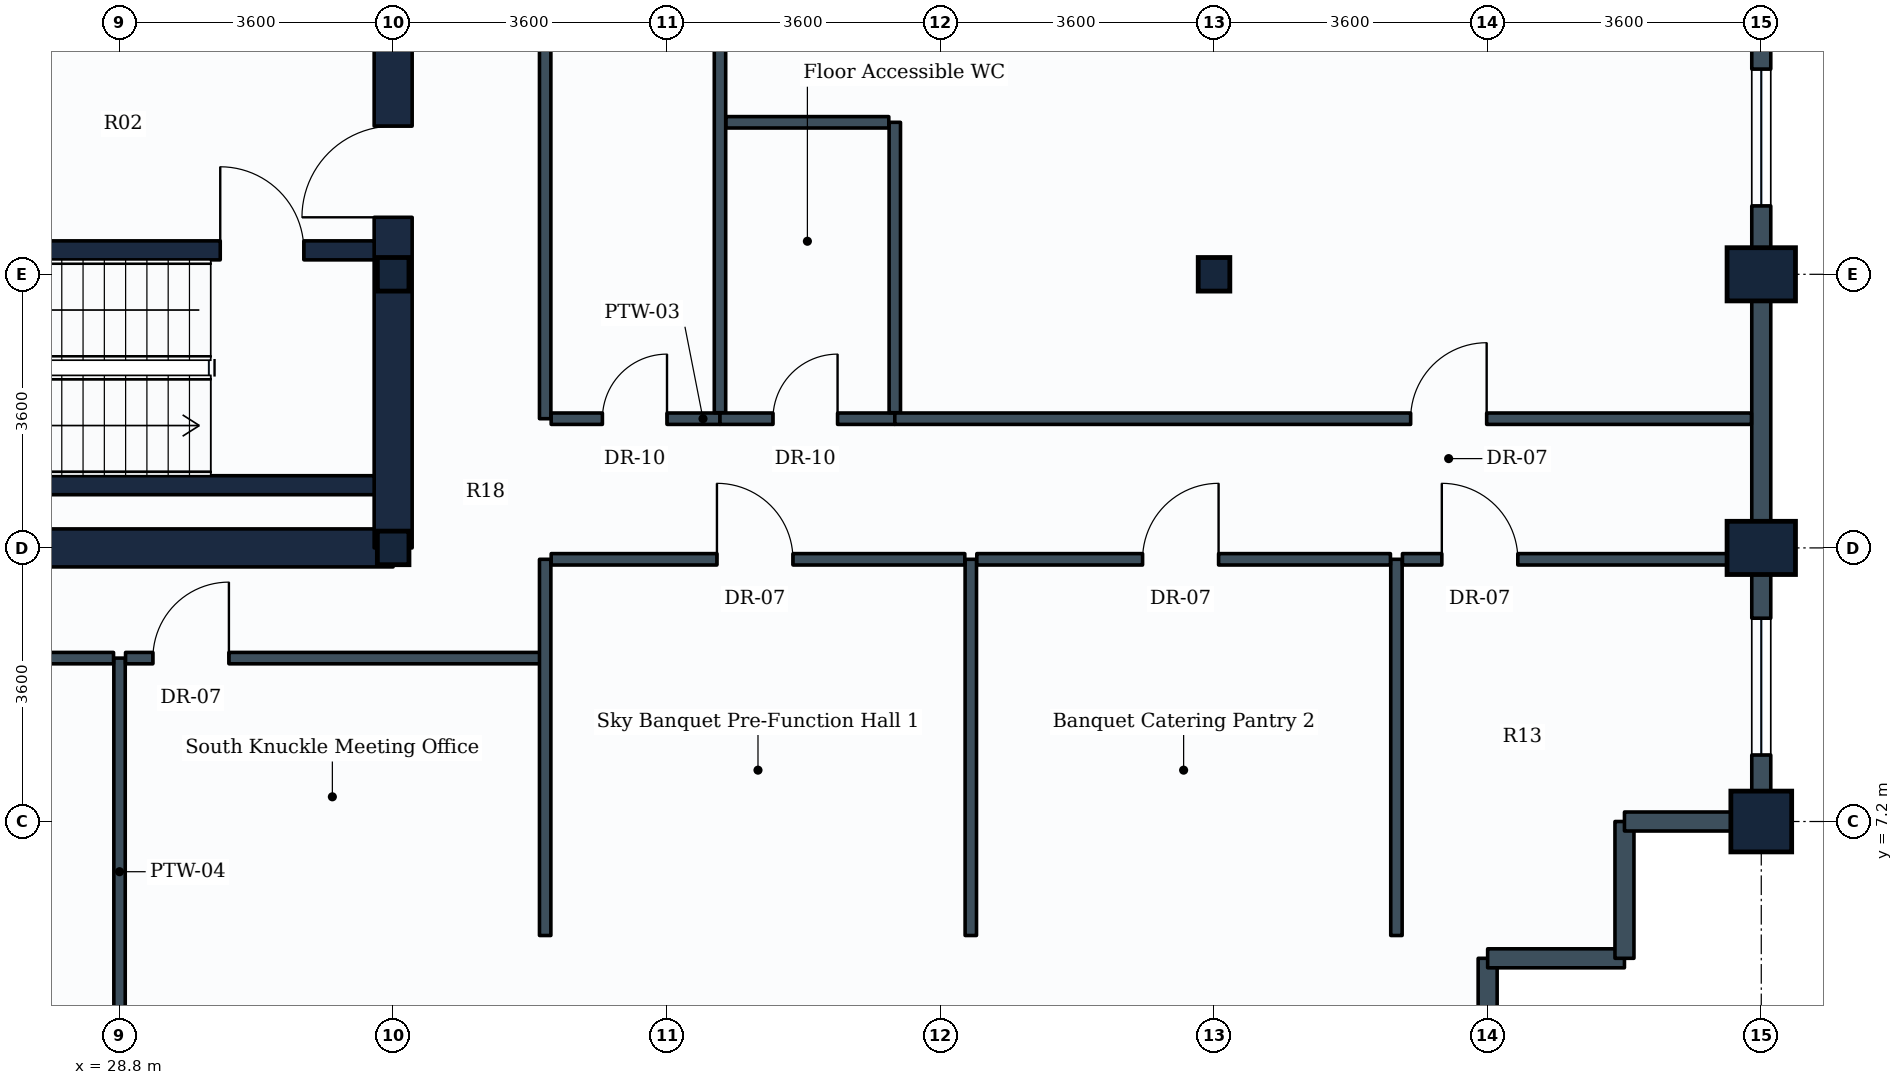
"""IFC4 building model, lengths in metres.
Left out: names, types, materials, properties, quantities, classifications, styles, units other than length and angle.
Written with IfcOpenShell. Run it as: python <this file> out.ifc"""

import sys

from ifc_helpers import new_model, si_unit, direction, frame, frame_2d, origin, origin_2d, place, context, subcontext, project, spatial, rectangle, i_section, extrude, element, fill, save


model = new_model("IFC4")
c1 = context("Model", 3, precision=1e-05, world=origin(), true_north=direction((0.0, 1.0)))
c2 = subcontext(c1, "Body", "Model", "MODEL_VIEW")
j1 = project(units=[si_unit("LENGTHUNIT", "METRE"), si_unit("PLANEANGLEUNIT", "RADIAN")], contexts=[c1])
p1 = place(None, origin())
s1 = spatial("IfcSite", under=j1, at=p1, CompositionType="ELEMENT")
p2 = place(p1, origin())
s2 = spatial("IfcBuilding", under=s1, at=p2, CompositionType="ELEMENT")
p3 = place(p2, frame((0.0, 0.0, 205.2)))
s3 = spatial("IfcBuildingStorey", under=s2, at=p3, CompositionType="ELEMENT", Elevation=205.2)
for number, where, z_axis, x_axis in (
    (1, (32.4, 10.8, 0.0), (0.0, 0.0, 1.0), (1.0, 0.0, 0.0)),
    (2, (32.4, 14.4, 0.0), (0.0, 0.0, 1.0), (1.0, 0.0, 0.0)),
    (3, (43.2, 14.4, 0.0), (0.0, 0.0, 1.0), (1.0, 0.0, 0.0)),
):
    element("IfcColumn", number, at=place(p3, frame(where, z_axis=z_axis, x_axis=x_axis)), inside=s3, PredefinedType="COLUMN", context=c2, shape_type="SweptSolid", body=[
        extrude(i_section(OverallWidth=0.416, OverallDepth=0.442, WebThickness=0.025, FlangeThickness=0.041, FilletRadius=0.015, at=origin_2d()), origin(), (0.0, 0.0, 1.0), 3.8),
    ])
p4 = place(p3, frame((50.4, 7.2, 0.0), z_axis=(0.0, 0.0, 1.0), x_axis=(1.0, 0.0, 0.0)))
e4 = element("IfcColumn", 4, at=p4, inside=s3, PredefinedType="COLUMN", context=c2, shape_type="SweptSolid", body=[
    extrude(rectangle(XDim=0.8, YDim=0.8, at=origin_2d()), origin(), (0.0, 0.0, 1.0), 3.8),
])
for number, where, z_axis, x_axis in (
    (5, (50.4, 10.8, 0.0), (0.0, 0.0, 1.0), (0.0, 1.0, 0.0)),
    (6, (50.4, 14.4, 0.0), (0.0, 0.0, 1.0), (0.0, 1.0, 0.0)),
):
    element("IfcColumn", number, at=place(p3, frame(where, z_axis=z_axis, x_axis=x_axis)), inside=s3, PredefinedType="COLUMN", context=c2, shape_type="SweptSolid", body=[
        extrude(rectangle(XDim=0.7, YDim=0.9, at=origin_2d()), origin(), (0.0, 0.0, 1.0), 3.8),
    ])
p5 = place(p3, frame((46.8, 5.4, 0.0), z_axis=(0.0, 0.0, 1.0), x_axis=(0.0, -1.0, 0.0)))
e7 = element("IfcWall", 7, at=p5, inside=s3, PredefinedType="STANDARD", context=c2, shape_type="SweptSolid", body=[
    extrude(rectangle(XDim=1.8, YDim=0.25, at=frame_2d((0.9, 0.0))), origin(), (0.0, 0.0, 1.0), 2.93),
])
for number, where, z_axis, x_axis in (
    (8, (48.6, 5.4, 0.0), (0.0, 0.0, 1.0), (-1.0, 0.0, 0.0)),
    (9, (48.6, 7.2, 0.0), (0.0, 0.0, 1.0), (0.0, -1.0, 0.0)),
):
    element("IfcWall", number, at=place(p3, frame(where, z_axis=z_axis, x_axis=x_axis)), inside=s3, PredefinedType="STANDARD", context=c2, shape_type="SweptSolid", body=[
        extrude(rectangle(XDim=1.8, YDim=0.25, at=frame_2d((0.9, 0.0))), origin(), (0.0, 0.0, 1.0), 3.465),
    ])
p6 = place(p3, frame((50.4, 7.2, 0.0), z_axis=(0.0, 0.0, 1.0), x_axis=(-1.0, 0.0, 0.0)))
e10 = element("IfcWall", 10, at=p6, inside=s3, PredefinedType="STANDARD", context=c2, shape_type="SweptSolid", body=[
    extrude(rectangle(XDim=1.8, YDim=0.25, at=frame_2d((0.9, 0.0))), origin(), (0.0, 0.0, 1.0), 2.93),
])
p7 = place(p3, frame((50.4, 10.8, 0.0), z_axis=(0.0, 0.0, 1.0), x_axis=(0.0, -1.0, 0.0)))
e11 = element("IfcWall", 11, at=p7, inside=s3, PredefinedType="STANDARD", context=c2, shape_type="SweptSolid", body=[
    extrude(rectangle(XDim=3.6, YDim=0.25, at=frame_2d((1.8, 0.0))), origin(), (0.0, 0.0, 1.0), 2.93),
])
p8 = place(p7, frame((0.925, 0.0, 0.85)))
e12 = element("IfcOpeningElement", 12, at=p8, cuts=e11, PredefinedType="OPENING", context=c2, shape_type="SweptSolid", body=[
    extrude(rectangle(XDim=1.8, YDim=1.35, at=frame_2d((0.9, 0.675))), frame((0.0, 0.135, 0.0), z_axis=(0.0, -1.0, 0.0), x_axis=(1.0, 0.0, 0.0)), (0.0, 0.0, 1.0), 0.27),
])
p9 = place(p3, frame((50.4, 14.4, 0.0), z_axis=(0.0, 0.0, 1.0), x_axis=(0.0, -1.0, 0.0)))
e13 = element("IfcWall", 13, at=p9, inside=s3, PredefinedType="STANDARD", context=c2, shape_type="SweptSolid", body=[
    extrude(rectangle(XDim=3.6, YDim=0.25, at=frame_2d((1.8, 0.0))), origin(), (0.0, 0.0, 1.0), 2.93),
])
p10 = place(p3, frame((50.4, 18.0, 0.0), z_axis=(0.0, 0.0, 1.0), x_axis=(0.0, -1.0, 0.0)))
e14 = element("IfcWall", 14, at=p10, inside=s3, PredefinedType="STANDARD", context=c2, shape_type="SweptSolid", body=[
    extrude(rectangle(XDim=3.6, YDim=0.25, at=frame_2d((1.8, 0.0))), origin(), (0.0, 0.0, 1.0), 2.93),
])
p11 = place(p10, frame((0.9, 0.0, 0.85)))
e15 = element("IfcOpeningElement", 15, at=p11, cuts=e14, PredefinedType="OPENING", context=c2, shape_type="SweptSolid", body=[
    extrude(rectangle(XDim=1.8, YDim=1.35, at=frame_2d((0.9, 0.675))), frame((0.0, 0.135, 0.0), z_axis=(0.0, -1.0, 0.0), x_axis=(1.0, 0.0, 0.0)), (0.0, 0.0, 1.0), 0.27),
])
p12 = place(p3, frame((14.4, 10.8, 0.0), z_axis=(0.0, 0.0, 1.0), x_axis=(1.0, 0.0, 0.0)))
e16 = element("IfcWall", 16, at=p12, inside=s3, PredefinedType="SHEAR", context=c2, shape_type="SweptSolid", body=[
    extrude(rectangle(XDim=18.0, YDim=0.5, at=frame_2d((9.0, 0.0))), origin(), (0.0, 0.0, 1.0), 3.48),
])
p13 = place(p3, frame((32.4, 10.8, 0.0), z_axis=(0.0, 0.0, 1.0), x_axis=(0.0, 1.0, 0.0)))
e17 = element("IfcWall", 17, at=p13, inside=s3, PredefinedType="SHEAR", context=c2, shape_type="SweptSolid", body=[
    extrude(rectangle(XDim=14.4, YDim=0.5, at=frame_2d((7.2, 0.0))), origin(), (0.0, 0.0, 1.0), 3.48),
])
p14 = place(p13, frame((4.35, 0.0, 0.0)))
e18 = element("IfcOpeningElement", 18, at=p14, cuts=e17, PredefinedType="OPENING", context=c2, shape_type="SweptSolid", body=[
    extrude(rectangle(XDim=1.2, YDim=2.1, at=frame_2d((0.6, 1.05))), frame((0.0, 0.26, 0.0), z_axis=(0.0, -1.0, 0.0), x_axis=(1.0, 0.0, 0.0)), (0.0, 0.0, 1.0), 0.52),
])
p15 = place(p13, frame((10.0, 0.0, 0.0)))
e19 = element("IfcOpeningElement", 19, at=p15, cuts=e17, PredefinedType="OPENING", context=c2, shape_type="SweptSolid", body=[
    extrude(rectangle(XDim=1.2, YDim=2.1, at=frame_2d((0.6, 1.05))), frame((0.0, 0.26, 0.0), z_axis=(0.0, -1.0, 0.0), x_axis=(1.0, 0.0, 0.0)), (0.0, 0.0, 1.0), 0.52),
])
p16 = place(p3, frame((23.35, 11.625, 0.0), z_axis=(0.0, 0.0, 1.0), x_axis=(1.0, 0.0, 0.0)))
e20 = element("IfcWall", 20, at=p16, inside=s3, PredefinedType="SHEAR", context=c2, shape_type="SweptSolid", body=[
    extrude(rectangle(XDim=8.8, YDim=0.25, at=frame_2d((4.4, 0.0))), origin(), (0.0, 0.0, 1.0), 3.48),
])
p17 = place(p3, frame((23.35, 14.715, 0.0), z_axis=(0.0, 0.0, 1.0), x_axis=(1.0, 0.0, 0.0)))
e21 = element("IfcWall", 21, at=p17, inside=s3, PredefinedType="SHEAR", context=c2, shape_type="SweptSolid", body=[
    extrude(rectangle(XDim=8.8, YDim=0.25, at=frame_2d((4.4, 0.0))), origin(), (0.0, 0.0, 1.0), 3.48),
])
p18 = place(p17, frame((6.775, 0.0, 0.0)))
e22 = element("IfcOpeningElement", 22, at=p18, cuts=e21, PredefinedType="OPENING", context=c2, shape_type="SweptSolid", body=[
    extrude(rectangle(XDim=1.1, YDim=2.1, at=frame_2d((0.55, 1.05))), frame((0.0, 0.135, 0.0), z_axis=(0.0, -1.0, 0.0), x_axis=(1.0, 0.0, 0.0)), (0.0, 0.0, 1.0), 0.27),
])
p19 = place(p3, frame((34.4, 12.5, 0.0), z_axis=(0.0, 0.0, 1.0), x_axis=(0.0, 1.0, 0.0)))
e23 = element("IfcWall", 23, at=p19, inside=s3, PredefinedType="PARTITIONING", context=c2, shape_type="SweptSolid", body=[
    extrude(rectangle(XDim=12.571, YDim=0.15, at=frame_2d((6.286, 0.0))), origin(), (0.0, 0.0, 1.0), 2.93),
])
p20 = place(p3, frame((34.479, 12.5, 0.0), z_axis=(0.0, 0.0, 1.0), x_axis=(1.0, 0.0, 0.0)))
e24 = element("IfcWall", 24, at=p20, inside=s3, PredefinedType="PARTITIONING", context=c2, shape_type="SweptSolid", body=[
    extrude(rectangle(XDim=2.221, YDim=0.15, at=frame_2d((1.11, 0.0))), origin(), (0.0, 0.0, 1.0), 3.19),
])
p21 = place(p20, frame((0.674, 0.0, 0.0)))
e25 = element("IfcOpeningElement", 25, at=p21, cuts=e24, PredefinedType="OPENING", context=c2, shape_type="SweptSolid", body=[
    extrude(rectangle(XDim=0.85, YDim=2.1, at=frame_2d((0.425, 1.05))), frame((0.0, 0.085, 0.0), z_axis=(0.0, -1.0, 0.0), x_axis=(1.0, 0.0, 0.0)), (0.0, 0.0, 1.0), 0.17),
])
p22 = place(p3, frame((36.7, 12.579, 0.0), z_axis=(0.0, 0.0, 1.0), x_axis=(0.0, 1.0, 0.0)))
e26 = element("IfcWall", 26, at=p22, inside=s3, PredefinedType="PARTITIONING", context=c2, shape_type="SweptSolid", body=[
    extrude(rectangle(XDim=12.492, YDim=0.15, at=frame_2d((6.246, 0.0))), origin(), (0.0, 0.0, 1.0), 2.93),
])
p23 = place(p3, frame((36.7, 12.5, 0.0), z_axis=(0.0, 0.0, 1.0), x_axis=(1.0, 0.0, 0.0)))
e27 = element("IfcWall", 27, at=p23, inside=s3, PredefinedType="PARTITIONING", context=c2, shape_type="SweptSolid", body=[
    extrude(rectangle(XDim=2.3, YDim=0.15, at=frame_2d((1.15, 0.0))), origin(), (0.0, 0.0, 1.0), 3.465),
])
p24 = place(p23, frame((0.697, 0.0, 0.0)))
e28 = element("IfcOpeningElement", 28, at=p24, cuts=e27, PredefinedType="OPENING", context=c2, shape_type="SweptSolid", body=[
    extrude(rectangle(XDim=0.85, YDim=2.1, at=frame_2d((0.425, 1.05))), frame((0.0, 0.085, 0.0), z_axis=(0.0, -1.0, 0.0), x_axis=(1.0, 0.0, 0.0)), (0.0, 0.0, 1.0), 0.17),
])
p25 = place(p3, frame((39.0, 12.579, 0.0), z_axis=(0.0, 0.0, 1.0), x_axis=(0.0, 1.0, 0.0)))
e29 = element("IfcWall", 29, at=p25, inside=s3, PredefinedType="PARTITIONING", context=c2, shape_type="SweptSolid", body=[
    extrude(rectangle(XDim=3.821, YDim=0.15, at=frame_2d((1.91, 0.0))), origin(), (0.0, 0.0, 1.0), 3.16),
])
p26 = place(p3, frame((36.779, 16.4, 0.0), z_axis=(0.0, 0.0, 1.0), x_axis=(1.0, 0.0, 0.0)))
e30 = element("IfcWall", 30, at=p26, inside=s3, PredefinedType="PARTITIONING", context=c2, shape_type="SweptSolid", body=[
    extrude(rectangle(XDim=2.142, YDim=0.15, at=frame_2d((1.071, 0.0))), origin(), (0.0, 0.0, 1.0), 3.465),
])
p27 = place(p3, frame((28.8, 9.35, 0.0), z_axis=(0.0, 0.0, 1.0), x_axis=(0.0, -1.0, 0.0)))
e31 = element("IfcWall", 31, at=p27, inside=s3, PredefinedType="PARTITIONING", context=c2, shape_type="SweptSolid", body=[
    extrude(rectangle(XDim=5.621, YDim=0.15, at=frame_2d((2.811, 0.0))), origin(), (0.0, 0.0, 1.0), 3.465),
])
p28 = place(p3, frame((12.95, 9.35, 0.0), z_axis=(0.0, 0.0, 1.0), x_axis=(1.0, 0.0, 0.0)))
e32 = element("IfcWall", 32, at=p28, inside=s3, PredefinedType="PARTITIONING", context=c2, shape_type="SweptSolid", body=[
    extrude(rectangle(XDim=15.771, YDim=0.15, at=frame_2d((7.885, 0.0))), origin(), (0.0, 0.0, 1.0), 3.15),
])
p29 = place(p28, frame((4.836, 0.0, 0.0)))
e33 = element("IfcOpeningElement", 33, at=p29, cuts=e32, PredefinedType="OPENING", context=c2, shape_type="SweptSolid", body=[
    extrude(rectangle(XDim=1.0, YDim=2.1, at=frame_2d((0.5, 1.05))), frame((0.0, 0.085, 0.0), z_axis=(0.0, -1.0, 0.0), x_axis=(1.0, 0.0, 0.0)), (0.0, 0.0, 1.0), 0.17),
])
p30 = place(p3, frame((28.879, 9.35, 0.0), z_axis=(0.0, 0.0, 1.0), x_axis=(1.0, 0.0, 0.0)))
e34 = element("IfcWall", 34, at=p30, inside=s3, PredefinedType="PARTITIONING", context=c2, shape_type="SweptSolid", body=[
    extrude(rectangle(XDim=5.521, YDim=0.15, at=frame_2d((2.76, 0.0))), origin(), (0.0, 0.0, 1.0), 3.465),
])
p31 = place(p30, frame((0.36, 0.0, 0.0)))
e35 = element("IfcOpeningElement", 35, at=p31, cuts=e34, PredefinedType="OPENING", context=c2, shape_type="SweptSolid", body=[
    extrude(rectangle(XDim=1.0, YDim=2.1, at=frame_2d((0.5, 1.05))), frame((0.0, 0.085, 0.0), z_axis=(0.0, -1.0, 0.0), x_axis=(1.0, 0.0, 0.0)), (0.0, 0.0, 1.0), 0.17),
])
p32 = place(p3, frame((34.4, 5.7, 0.0), z_axis=(0.0, 0.0, 1.0), x_axis=(0.0, 1.0, 0.0)))
e36 = element("IfcWall", 36, at=p32, inside=s3, PredefinedType="PARTITIONING", context=c2, shape_type="SweptSolid", body=[
    extrude(rectangle(XDim=4.95, YDim=0.15, at=frame_2d((2.475, 0.0))), origin(), (0.0, 0.0, 1.0), 3.465),
])
p33 = place(p3, frame((40.0, 5.7, 0.0), z_axis=(0.0, 0.0, 1.0), x_axis=(0.0, 1.0, 0.0)))
e37 = element("IfcWall", 37, at=p33, inside=s3, PredefinedType="PARTITIONING", context=c2, shape_type="SweptSolid", body=[
    extrude(rectangle(XDim=4.95, YDim=0.15, at=frame_2d((2.475, 0.0))), origin(), (0.0, 0.0, 1.0), 3.13),
])
p34 = place(p3, frame((34.479, 10.65, 0.0), z_axis=(0.0, 0.0, 1.0), x_axis=(1.0, 0.0, 0.0)))
e38 = element("IfcWall", 38, at=p34, inside=s3, PredefinedType="PARTITIONING", context=c2, shape_type="SweptSolid", body=[
    extrude(rectangle(XDim=5.442, YDim=0.15, at=frame_2d((2.721, 0.0))), origin(), (0.0, 0.0, 1.0), 3.1),
])
p35 = place(p34, frame((2.181, 0.0, 0.0)))
e39 = element("IfcOpeningElement", 39, at=p35, cuts=e38, PredefinedType="OPENING", context=c2, shape_type="SweptSolid", body=[
    extrude(rectangle(XDim=1.0, YDim=2.1, at=frame_2d((0.5, 1.05))), frame((0.0, 0.085, 0.0), z_axis=(0.0, -1.0, 0.0), x_axis=(1.0, 0.0, 0.0)), (0.0, 0.0, 1.0), 0.17),
])
p36 = place(p3, frame((45.6, 5.7, 0.0), z_axis=(0.0, 0.0, 1.0), x_axis=(0.0, 1.0, 0.0)))
e40 = element("IfcWall", 40, at=p36, inside=s3, PredefinedType="PARTITIONING", context=c2, shape_type="SweptSolid", body=[
    extrude(rectangle(XDim=4.95, YDim=0.15, at=frame_2d((2.475, 0.0))), origin(), (0.0, 0.0, 1.0), 3.465),
])
p37 = place(p3, frame((40.079, 10.65, 0.0), z_axis=(0.0, 0.0, 1.0), x_axis=(1.0, 0.0, 0.0)))
e41 = element("IfcWall", 41, at=p37, inside=s3, PredefinedType="PARTITIONING", context=c2, shape_type="SweptSolid", body=[
    extrude(rectangle(XDim=5.442, YDim=0.15, at=frame_2d((2.721, 0.0))), origin(), (0.0, 0.0, 1.0), 3.1),
])
p38 = place(p37, frame((2.181, 0.0, 0.0)))
e42 = element("IfcOpeningElement", 42, at=p38, cuts=e41, PredefinedType="OPENING", context=c2, shape_type="SweptSolid", body=[
    extrude(rectangle(XDim=1.0, YDim=2.1, at=frame_2d((0.5, 1.05))), frame((0.0, 0.085, 0.0), z_axis=(0.0, -1.0, 0.0), x_axis=(1.0, 0.0, 0.0)), (0.0, 0.0, 1.0), 0.17),
])
p39 = place(p3, frame((45.679, 10.65, 0.0), z_axis=(0.0, 0.0, 1.0), x_axis=(1.0, 0.0, 0.0)))
e43 = element("IfcWall", 43, at=p39, inside=s3, PredefinedType="PARTITIONING", context=c2, shape_type="SweptSolid", body=[
    extrude(rectangle(XDim=4.592, YDim=0.15, at=frame_2d((2.296, 0.0))), origin(), (0.0, 0.0, 1.0), 2.93),
])
p40 = place(p39, frame((0.518, 0.0, 0.0)))
e44 = element("IfcOpeningElement", 44, at=p40, cuts=e43, PredefinedType="OPENING", context=c2, shape_type="SweptSolid", body=[
    extrude(rectangle(XDim=1.0, YDim=2.1, at=frame_2d((0.5, 1.05))), frame((0.0, 0.085, 0.0), z_axis=(0.0, -1.0, 0.0), x_axis=(1.0, 0.0, 0.0)), (0.0, 0.0, 1.0), 0.17),
])
p41 = place(p3, frame((39.0, 12.5, 0.0), z_axis=(0.0, 0.0, 1.0), x_axis=(1.0, 0.0, 0.0)))
e45 = element("IfcWall", 45, at=p41, inside=s3, PredefinedType="PARTITIONING", context=c2, shape_type="SweptSolid", body=[
    extrude(rectangle(XDim=11.271, YDim=0.15, at=frame_2d((5.635, 0.0))), origin(), (0.0, 0.0, 1.0), 2.93),
])
p42 = place(p41, frame((6.787, 0.0, 0.0)))
e46 = element("IfcOpeningElement", 46, at=p42, cuts=e45, PredefinedType="OPENING", context=c2, shape_type="SweptSolid", body=[
    extrude(rectangle(XDim=1.0, YDim=2.1, at=frame_2d((0.5, 1.05))), frame((0.0, 0.085, 0.0), z_axis=(0.0, -1.0, 0.0), x_axis=(1.0, 0.0, 0.0)), (0.0, 0.0, 1.0), 0.17),
])
p43 = place(p8, origin())
e47 = element("IfcWindow", 47, at=p43, inside=s3, PartitioningType="SINGLE_PANEL", PredefinedType="WINDOW", context=c2, shape_type="SweptSolid", body=[
    extrude(rectangle(XDim=1.8, YDim=1.35, at=frame_2d((0.9, 0.675))), frame((0.0, 0.03, 0.0), z_axis=(0.0, -1.0, 0.0), x_axis=(1.0, 0.0, 0.0)), (0.0, 0.0, 1.0), 0.06),
])
fill(e12, e47)
p44 = place(p11, origin())
e48 = element("IfcWindow", 48, at=p44, inside=s3, PartitioningType="SINGLE_PANEL", PredefinedType="WINDOW", context=c2, shape_type="SweptSolid", body=[
    extrude(rectangle(XDim=1.8, YDim=1.35, at=frame_2d((0.9, 0.675))), frame((0.0, 0.03, 0.0), z_axis=(0.0, -1.0, 0.0), x_axis=(1.0, 0.0, 0.0)), (0.0, 0.0, 1.0), 0.06),
])
fill(e15, e48)
p45 = place(p18, origin())
e49 = element("IfcDoor", 49, at=p45, inside=s3, OperationType="SINGLE_SWING_LEFT", PredefinedType="DOOR", context=c2, shape_type="SweptSolid", body=[
    extrude(rectangle(XDim=1.1, YDim=2.1, at=frame_2d((0.55, 1.05))), frame((0.0, 0.025, 0.0), z_axis=(0.0, -1.0, 0.0), x_axis=(1.0, 0.0, 0.0)), (0.0, 0.0, 1.0), 0.05),
])
fill(e22, e49)
p46 = place(p14, origin())
e50 = element("IfcDoor", 50, at=p46, inside=s3, OperationType="SINGLE_SWING_LEFT", PredefinedType="DOOR", context=c2, shape_type="SweptSolid", body=[
    extrude(rectangle(XDim=1.2, YDim=2.1, at=frame_2d((0.6, 1.05))), frame((0.0, 0.025, 0.0), z_axis=(0.0, -1.0, 0.0), x_axis=(1.0, 0.0, 0.0)), (0.0, 0.0, 1.0), 0.05),
])
fill(e18, e50)
p47 = place(p21, origin())
e51 = element("IfcDoor", 51, at=p47, inside=s3, OperationType="SINGLE_SWING_RIGHT", PredefinedType="DOOR", context=c2, shape_type="SweptSolid", body=[
    extrude(rectangle(XDim=0.85, YDim=2.1, at=frame_2d((0.425, 1.05))), frame((0.0, 0.025, 0.0), z_axis=(0.0, -1.0, 0.0), x_axis=(1.0, 0.0, 0.0)), (0.0, 0.0, 1.0), 0.05),
])
fill(e25, e51)
p48 = place(p24, origin())
e52 = element("IfcDoor", 52, at=p48, inside=s3, OperationType="SINGLE_SWING_RIGHT", PredefinedType="DOOR", context=c2, shape_type="SweptSolid", body=[
    extrude(rectangle(XDim=0.85, YDim=2.1, at=frame_2d((0.425, 1.05))), frame((0.0, 0.025, 0.0), z_axis=(0.0, -1.0, 0.0), x_axis=(1.0, 0.0, 0.0)), (0.0, 0.0, 1.0), 0.05),
])
fill(e28, e52)
p49 = place(p31, origin())
e53 = element("IfcDoor", 53, at=p49, inside=s3, OperationType="SINGLE_SWING_RIGHT", PredefinedType="DOOR", context=c2, shape_type="SweptSolid", body=[
    extrude(rectangle(XDim=1.0, YDim=2.1, at=frame_2d((0.5, 1.05))), frame((0.0, 0.025, 0.0), z_axis=(0.0, -1.0, 0.0), x_axis=(1.0, 0.0, 0.0)), (0.0, 0.0, 1.0), 0.05),
])
fill(e35, e53)
p50 = place(p35, origin())
e54 = element("IfcDoor", 54, at=p50, inside=s3, OperationType="SINGLE_SWING_LEFT", PredefinedType="DOOR", context=c2, shape_type="SweptSolid", body=[
    extrude(rectangle(XDim=1.0, YDim=2.1, at=frame_2d((0.5, 1.05))), frame((0.0, 0.025, 0.0), z_axis=(0.0, -1.0, 0.0), x_axis=(1.0, 0.0, 0.0)), (0.0, 0.0, 1.0), 0.05),
])
fill(e39, e54)
p51 = place(p38, origin())
e55 = element("IfcDoor", 55, at=p51, inside=s3, OperationType="SINGLE_SWING_RIGHT", PredefinedType="DOOR", context=c2, shape_type="SweptSolid", body=[
    extrude(rectangle(XDim=1.0, YDim=2.1, at=frame_2d((0.5, 1.05))), frame((0.0, 0.025, 0.0), z_axis=(0.0, -1.0, 0.0), x_axis=(1.0, 0.0, 0.0)), (0.0, 0.0, 1.0), 0.05),
])
fill(e42, e55)
p52 = place(p40, origin())
e56 = element("IfcDoor", 56, at=p52, inside=s3, OperationType="SINGLE_SWING_LEFT", PredefinedType="DOOR", context=c2, shape_type="SweptSolid", body=[
    extrude(rectangle(XDim=1.0, YDim=2.1, at=frame_2d((0.5, 1.05))), frame((0.0, 0.025, 0.0), z_axis=(0.0, -1.0, 0.0), x_axis=(1.0, 0.0, 0.0)), (0.0, 0.0, 1.0), 0.05),
])
fill(e44, e56)
p53 = place(p42, origin())
e57 = element("IfcDoor", 57, at=p53, inside=s3, OperationType="SINGLE_SWING_RIGHT", PredefinedType="DOOR", context=c2, shape_type="SweptSolid", body=[
    extrude(rectangle(XDim=1.0, YDim=2.1, at=frame_2d((0.5, 1.05))), frame((0.0, 0.025, 0.0), z_axis=(0.0, -1.0, 0.0), x_axis=(1.0, 0.0, 0.0)), (0.0, 0.0, 1.0), 0.05),
])
fill(e46, e57)
save(model, sys.argv[1])
